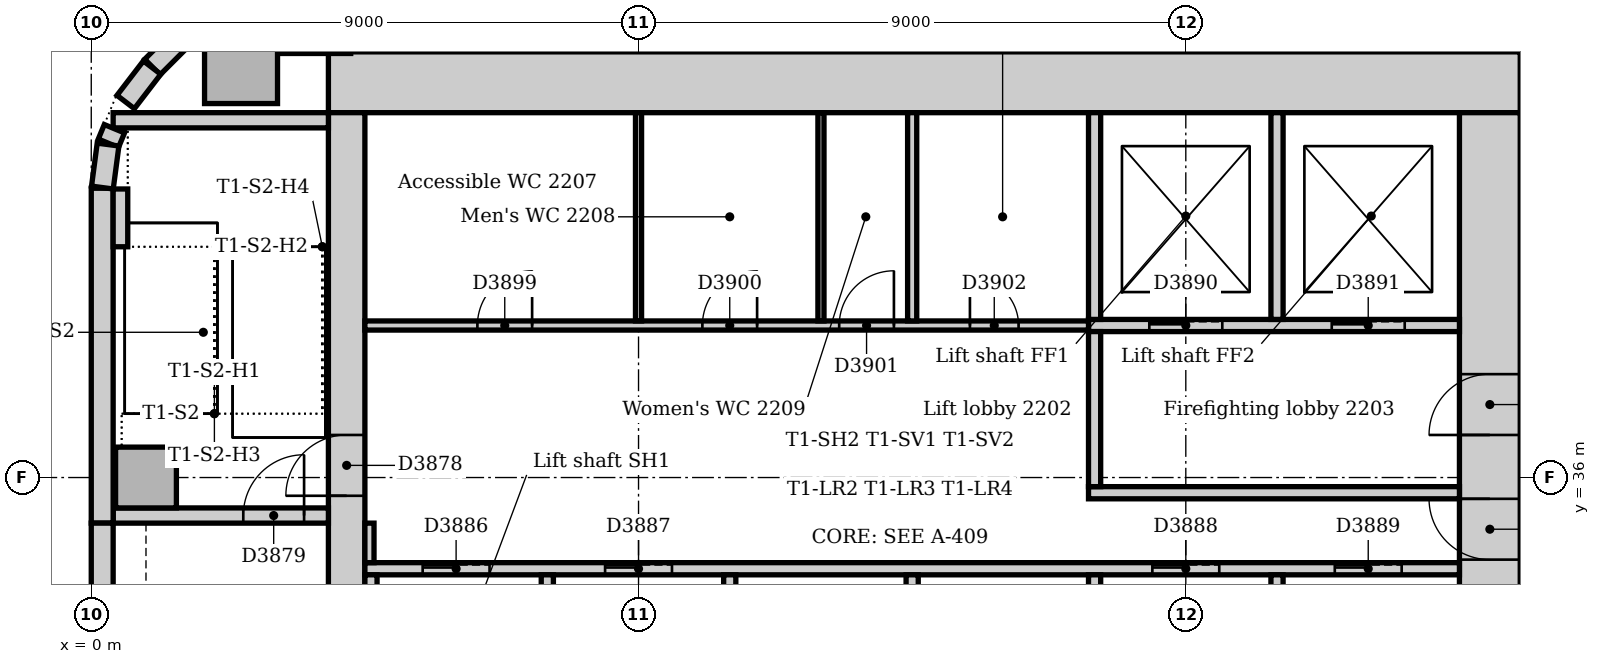
"""IFC4 building model, lengths in metres.
Left out: names, types, materials, properties, quantities, classifications, styles, units other than length and angle.
Written with IfcOpenShell. Run it as: python <this file> out.ifc"""

import sys

from ifc_helpers import new_model, si_unit, direction, frame, frame_2d, origin, origin_2d, place, context, subcontext, project, spatial, rectangle, extrude, element, fill, save


model = new_model("IFC4")
c1 = context("Model", 3, precision=1e-05, world=origin(), true_north=direction((0.0, 1.0)))
c2 = subcontext(c1, "Body", "Model", "MODEL_VIEW")
j1 = project(units=[si_unit("LENGTHUNIT", "METRE"), si_unit("PLANEANGLEUNIT", "RADIAN")], contexts=[c1])
p1 = place(None, origin())
s1 = spatial("IfcSite", under=j1, at=p1, CompositionType="ELEMENT")
p2 = place(p1, origin())
s2 = spatial("IfcBuilding", under=s1, at=p2, CompositionType="ELEMENT")
p3 = place(p2, frame((0.0, 0.0, 95.0)))
s3 = spatial("IfcBuildingStorey", under=s2, at=p3, CompositionType="ELEMENT", Elevation=95.0)
p4 = place(p3, frame((23.5, 42.5, 0.0), z_axis=(0.0, 0.0, 1.0), x_axis=(-1.0, 0.0, 0.0)))
e1 = element("IfcWall", 1, at=p4, inside=s3, PredefinedType="SOLIDWALL", context=c2, shape_type="SweptSolid", body=[
    extrude(rectangle(XDim=19.6, YDim=1.0, at=frame_2d((9.8, 0.0))), origin(), (0.0, 0.0, 1.0), 5.0),
])
p5 = place(p3, frame((23.0, 31.5, 0.0), z_axis=(0.0, 0.0, 1.0), x_axis=(0.0, 1.0, 0.0)))
e2 = element("IfcWall", 2, at=p5, inside=s3, PredefinedType="SOLIDWALL", context=c2, shape_type="SweptSolid", body=[
    extrude(rectangle(XDim=10.5, YDim=1.0, at=frame_2d((5.25, 0.0))), origin(), (0.0, 0.0, 1.0), 5.0),
])
p6 = place(p5, frame((3.15, 0.0, 0.0)))
e3 = element("IfcOpeningElement", 3, at=p6, cuts=e2, PredefinedType="OPENING", context=c2, shape_type="SweptSolid", body=[
    extrude(rectangle(XDim=1.0, YDim=2.1, at=frame_2d((0.5, 1.05))), frame((0.0, 0.51, 0.0), z_axis=(0.0, -1.0, 0.0), x_axis=(1.0, 0.0, 0.0)), (0.0, 0.0, 1.0), 1.02),
])
p7 = place(p5, frame((5.2, 0.0, 0.0)))
e4 = element("IfcOpeningElement", 4, at=p7, cuts=e2, PredefinedType="OPENING", context=c2, shape_type="SweptSolid", body=[
    extrude(rectangle(XDim=1.0, YDim=2.1, at=frame_2d((0.5, 1.05))), frame((0.0, 0.51, 0.0), z_axis=(0.0, -1.0, 0.0), x_axis=(1.0, 0.0, 0.0)), (0.0, 0.0, 1.0), 1.02),
])
p8 = place(p3, frame((4.2, 42.0, 0.0), z_axis=(0.0, 0.0, 1.0), x_axis=(0.0, -1.0, 0.0)))
e5 = element("IfcWall", 5, at=p8, inside=s3, PredefinedType="SOLIDWALL", context=c2, shape_type="SweptSolid", body=[
    extrude(rectangle(XDim=10.5, YDim=0.6, at=frame_2d((5.25, 0.0))), origin(), (0.0, 0.0, 1.0), 5.0),
])
p9 = place(p8, frame((5.3, 0.0, 0.0)))
e6 = element("IfcOpeningElement", 6, at=p9, cuts=e5, PredefinedType="OPENING", context=c2, shape_type="SweptSolid", body=[
    extrude(rectangle(XDim=1.0, YDim=2.1, at=frame_2d((0.5, 1.05))), frame((0.0, 0.31, 0.0), z_axis=(0.0, -1.0, 0.0), x_axis=(1.0, 0.0, 0.0)), (0.0, 0.0, 1.0), 0.62),
])
p10 = place(p3, frame((0.36, 35.375, 0.0), z_axis=(0.0, 0.0, 1.0), x_axis=(1.0, 0.0, 0.0)))
e7 = element("IfcWall", 7, at=p10, inside=s3, PredefinedType="SOLIDWALL", context=c2, shape_type="SweptSolid", body=[
    extrude(rectangle(XDim=3.54, YDim=0.25, at=frame_2d((1.77, 0.0))), origin(), (0.0, 0.0, 1.0), 5.0),
])
p11 = place(p10, frame((2.14, 0.0, 0.0)))
e8 = element("IfcOpeningElement", 8, at=p11, cuts=e7, PredefinedType="OPENING", context=c2, shape_type="SweptSolid", body=[
    extrude(rectangle(XDim=1.0, YDim=2.1, at=frame_2d((0.5, 1.05))), frame((0.0, 0.135, 0.0), z_axis=(0.0, -1.0, 0.0), x_axis=(1.0, 0.0, 0.0)), (0.0, 0.0, 1.0), 0.27),
])
p12 = place(p3, frame((3.9, 41.875, 0.0), z_axis=(0.0, 0.0, 1.0), x_axis=(-1.0, 0.0, 0.0)))
e9 = element("IfcWall", 9, at=p12, inside=s3, PredefinedType="SOLIDWALL", context=c2, shape_type="SweptSolid", body=[
    extrude(rectangle(XDim=3.54, YDim=0.25, at=frame_2d((1.77, 0.0))), origin(), (0.0, 0.0, 1.0), 5.0),
])
for number, where, z_axis, x_axis in (
    (10, (3.667, 43.574, 0.0), (0.0, 0.0, 1.0), (1.0, 0.0, 0.0)),
    (11, (2.463, 42.75, 0.0), (0.0, 0.0, 1.0), (1.0, 0.0, 0.0)),
):
    element("IfcColumn", number, at=place(p3, frame(where, z_axis=z_axis, x_axis=x_axis)), inside=s3, PredefinedType="COLUMN", context=c2, shape_type="SweptSolid", body=[
        extrude(rectangle(XDim=1.2, YDim=1.2, at=origin_2d()), origin(), (0.0, 0.0, 1.0), 4.85),
    ])
p13 = place(p3, frame((0.9, 36.0, 0.0), z_axis=(0.0, 0.0, 1.0), x_axis=(1.0, 0.0, 0.0)))
e12 = element("IfcColumn", 12, at=p13, inside=s3, PredefinedType="COLUMN", context=c2, shape_type="SweptSolid", body=[
    extrude(rectangle(XDim=1.0, YDim=1.0, at=origin_2d()), origin(), (0.0, 0.0, 1.0), 5.0),
])
p14 = place(p3, frame((2.249, 43.994, 0.0), z_axis=(0.0, 0.0, 1.0), x_axis=(-0.707106781187, -0.707106781187, 0.0)))
e13 = element("IfcWall", 13, at=p14, inside=s3, PredefinedType="STANDARD", context=c2, shape_type="SweptSolid", body=[
    extrude(rectangle(XDim=1.757, YDim=0.36, at=frame_2d((0.879, 0.0))), origin(), (0.0, 0.0, 1.0), 3.25),
])
p15 = place(p3, frame((0.18, 40.757, 0.0), z_axis=(0.0, 0.0, 1.0), x_axis=(0.0, -1.0, 0.0)))
e14 = element("IfcWall", 14, at=p15, inside=s3, PredefinedType="STANDARD", context=c2, shape_type="SweptSolid", body=[
    extrude(rectangle(XDim=5.507, YDim=0.36, at=frame_2d((2.754, 0.0))), origin(), (0.0, 0.0, 1.0), 4.85),
])
p16 = place(p3, frame((0.18, 35.25, 0.0), z_axis=(0.0, 0.0, 1.0), x_axis=(0.0, -1.0, 0.0)))
e15 = element("IfcWall", 15, at=p16, inside=s3, PredefinedType="STANDARD", context=c2, shape_type="SweptSolid", body=[
    extrude(rectangle(XDim=7.5, YDim=0.36, at=frame_2d((3.75, 0.0))), origin(), (0.0, 0.0, 1.0), 4.85),
])
p17 = place(p3, frame((1.0, 42.741, 0.0), z_axis=(0.0, 0.0, 1.0), x_axis=(-0.608802368033, -0.793321924995, 0.0)))
e16 = element("IfcWall", 16, at=p17, inside=s3, PredefinedType="STANDARD", context=c2, shape_type="SweptSolid", body=[
    extrude(rectangle(XDim=0.713, YDim=0.36, at=frame_2d((0.357, 0.0))), origin(), (0.0, 0.0, 1.0), 3.25),
])
p18 = place(p3, frame((0.381, 41.736, 0.0), z_axis=(0.0, 0.0, 1.0), x_axis=(-0.382773360986, -0.923842277729, 0.0)))
e17 = element("IfcWall", 17, at=p18, inside=s3, PredefinedType="STANDARD", context=c2, shape_type="SweptSolid", body=[
    extrude(rectangle(XDim=0.258, YDim=0.36, at=frame_2d((0.129, 0.0))), origin(), (0.0, 0.0, 1.0), 3.25),
])
p19 = place(p3, frame((0.276, 41.476, 0.0), z_axis=(0.0, 0.0, 1.0), x_axis=(-0.13055608231, -0.99144092581, 0.0)))
e18 = element("IfcWall", 18, at=p19, inside=s3, PredefinedType="STANDARD", context=c2, shape_type="SweptSolid", body=[
    extrude(rectangle(XDim=0.713, YDim=0.36, at=frame_2d((0.356, 0.0))), origin(), (0.0, 0.0, 1.0), 3.25),
])
p20 = place(p3, frame((0.48, 39.795, 0.0), z_axis=(0.0, 0.0, 1.0), x_axis=(0.0, 1.0, 0.0)))
e19 = element("IfcWall", 19, at=p20, inside=s3, PredefinedType="STANDARD", context=c2, shape_type="SweptSolid", body=[
    extrude(rectangle(XDim=0.95, YDim=0.24, at=frame_2d((0.475, 0.0))), origin(), (0.0, 0.0, 1.0), 5.0),
])
p21 = place(p3, frame((16.4, 35.75, 0.0), z_axis=(0.0, 0.0, 1.0), x_axis=(1.0, 0.0, 0.0)))
e20 = element("IfcWall", 20, at=p21, inside=s3, PredefinedType="PARTITIONING", context=c2, shape_type="SweptSolid", body=[
    extrude(rectangle(XDim=6.1, YDim=0.2, at=frame_2d((3.05, 0.0))), origin(), (0.0, 0.0, 1.0), 4.85),
])
p22 = place(p3, frame((16.4, 38.5, 0.0), z_axis=(0.0, 0.0, 1.0), x_axis=(1.0, 0.0, 0.0)))
e21 = element("IfcWall", 21, at=p22, inside=s3, PredefinedType="PARTITIONING", context=c2, shape_type="SweptSolid", body=[
    extrude(rectangle(XDim=6.1, YDim=0.2, at=frame_2d((3.05, 0.0))), origin(), (0.0, 0.0, 1.0), 4.85),
])
p23 = place(p22, frame((1.0, 0.0, 0.0)))
e22 = element("IfcOpeningElement", 22, at=p23, cuts=e21, PredefinedType="OPENING", context=c2, shape_type="SweptSolid", body=[
    extrude(rectangle(XDim=1.2, YDim=2.1, at=frame_2d((0.6, 1.05))), frame((0.0, 0.11, 0.0), z_axis=(0.0, -1.0, 0.0), x_axis=(1.0, 0.0, 0.0)), (0.0, 0.0, 1.0), 0.22),
])
p24 = place(p22, frame((4.0, 0.0, 0.0)))
e23 = element("IfcOpeningElement", 23, at=p24, cuts=e21, PredefinedType="OPENING", context=c2, shape_type="SweptSolid", body=[
    extrude(rectangle(XDim=1.2, YDim=2.1, at=frame_2d((0.6, 1.05))), frame((0.0, 0.11, 0.0), z_axis=(0.0, -1.0, 0.0), x_axis=(1.0, 0.0, 0.0)), (0.0, 0.0, 1.0), 0.22),
])
p25 = place(p3, frame((16.5, 35.85, 0.0), z_axis=(0.0, 0.0, 1.0), x_axis=(0.0, 1.0, 0.0)))
e24 = element("IfcWall", 24, at=p25, inside=s3, PredefinedType="PARTITIONING", context=c2, shape_type="SweptSolid", body=[
    extrude(rectangle(XDim=2.55, YDim=0.2, at=frame_2d((1.275, 0.0))), origin(), (0.0, 0.0, 1.0), 4.85),
])
p26 = place(p3, frame((4.5, 34.5, 0.0), z_axis=(0.0, 0.0, 1.0), x_axis=(1.0, 0.0, 0.0)))
e25 = element("IfcWall", 25, at=p26, inside=s3, PredefinedType="PARTITIONING", context=c2, shape_type="SweptSolid", body=[
    extrude(rectangle(XDim=18.0, YDim=0.2, at=frame_2d((9.0, 0.0))), origin(), (0.0, 0.0, 1.0), 4.85),
])
p27 = place(p26, frame((0.95, 0.0, 0.0)))
e26 = element("IfcOpeningElement", 26, at=p27, cuts=e25, PredefinedType="OPENING", context=c2, shape_type="SweptSolid", body=[
    extrude(rectangle(XDim=1.1, YDim=2.1, at=frame_2d((0.55, 1.05))), frame((0.0, 0.11, 0.0), z_axis=(0.0, -1.0, 0.0), x_axis=(1.0, 0.0, 0.0)), (0.0, 0.0, 1.0), 0.22),
])
p28 = place(p26, frame((3.95, 0.0, 0.0)))
e27 = element("IfcOpeningElement", 27, at=p28, cuts=e25, PredefinedType="OPENING", context=c2, shape_type="SweptSolid", body=[
    extrude(rectangle(XDim=1.1, YDim=2.1, at=frame_2d((0.55, 1.05))), frame((0.0, 0.11, 0.0), z_axis=(0.0, -1.0, 0.0), x_axis=(1.0, 0.0, 0.0)), (0.0, 0.0, 1.0), 0.22),
])
p29 = place(p26, frame((12.95, 0.0, 0.0)))
e28 = element("IfcOpeningElement", 28, at=p29, cuts=e25, PredefinedType="OPENING", context=c2, shape_type="SweptSolid", body=[
    extrude(rectangle(XDim=1.1, YDim=2.1, at=frame_2d((0.55, 1.05))), frame((0.0, 0.11, 0.0), z_axis=(0.0, -1.0, 0.0), x_axis=(1.0, 0.0, 0.0)), (0.0, 0.0, 1.0), 0.22),
])
p30 = place(p26, frame((15.95, 0.0, 0.0)))
e29 = element("IfcOpeningElement", 29, at=p30, cuts=e25, PredefinedType="OPENING", context=c2, shape_type="SweptSolid", body=[
    extrude(rectangle(XDim=1.1, YDim=2.1, at=frame_2d((0.55, 1.05))), frame((0.0, 0.11, 0.0), z_axis=(0.0, -1.0, 0.0), x_axis=(1.0, 0.0, 0.0)), (0.0, 0.0, 1.0), 0.22),
])
for number, where, z_axis, x_axis in (
    (30, (16.5, 38.6, 0.0), (0.0, 0.0, 1.0), (0.0, 1.0, 0.0)),
    (31, (19.5, 38.6, 0.0), (0.0, 0.0, 1.0), (0.0, 1.0, 0.0)),
):
    element("IfcWall", number, at=place(p3, frame(where, z_axis=z_axis, x_axis=x_axis)), inside=s3, PredefinedType="PARTITIONING", context=c2, shape_type="SweptSolid", body=[
        extrude(rectangle(XDim=3.4, YDim=0.2, at=frame_2d((1.7, 0.0))), origin(), (0.0, 0.0, 1.0), 4.85),
    ])
for number, where, z_axis, x_axis in (
    (32, (4.6, 31.75, 0.0), (0.0, 0.0, 1.0), (0.0, 1.0, 0.0)),
    (33, (7.5, 31.75, 0.0), (0.0, 0.0, 1.0), (0.0, 1.0, 0.0)),
    (34, (10.5, 31.75, 0.0), (0.0, 0.0, 1.0), (0.0, 1.0, 0.0)),
    (35, (13.5, 31.75, 0.0), (0.0, 0.0, 1.0), (0.0, 1.0, 0.0)),
    (36, (16.5, 31.75, 0.0), (0.0, 0.0, 1.0), (0.0, 1.0, 0.0)),
    (37, (19.5, 31.75, 0.0), (0.0, 0.0, 1.0), (0.0, 1.0, 0.0)),
):
    element("IfcWall", number, at=place(p3, frame(where, z_axis=z_axis, x_axis=x_axis)), inside=s3, PredefinedType="PARTITIONING", context=c2, shape_type="SweptSolid", body=[
        extrude(rectangle(XDim=2.65, YDim=0.2, at=frame_2d((1.325, 0.0))), origin(), (0.0, 0.0, 1.0), 4.85),
    ])
p31 = place(p3, frame((4.5, 38.5, 0.0), z_axis=(0.0, 0.0, 1.0), x_axis=(1.0, 0.0, 0.0)))
e38 = element("IfcWall", 38, at=p31, inside=s3, PredefinedType="PARTITIONING", context=c2, shape_type="SweptSolid", body=[
    extrude(rectangle(XDim=11.9, YDim=0.15, at=frame_2d((5.95, 0.0))), origin(), (0.0, 0.0, 1.0), 4.85),
])
p32 = place(p31, frame((1.85, 0.0, 0.0)))
e39 = element("IfcOpeningElement", 39, at=p32, cuts=e38, PredefinedType="OPENING", context=c2, shape_type="SweptSolid", body=[
    extrude(rectangle(XDim=0.9, YDim=2.1, at=frame_2d((0.45, 1.05))), frame((0.0, 0.085, 0.0), z_axis=(0.0, -1.0, 0.0), x_axis=(1.0, 0.0, 0.0)), (0.0, 0.0, 1.0), 0.17),
])
p33 = place(p31, frame((5.55, 0.0, 0.0)))
e40 = element("IfcOpeningElement", 40, at=p33, cuts=e38, PredefinedType="OPENING", context=c2, shape_type="SweptSolid", body=[
    extrude(rectangle(XDim=0.9, YDim=2.1, at=frame_2d((0.45, 1.05))), frame((0.0, 0.085, 0.0), z_axis=(0.0, -1.0, 0.0), x_axis=(1.0, 0.0, 0.0)), (0.0, 0.0, 1.0), 0.17),
])
p34 = place(p31, frame((7.8, 0.0, 0.0)))
e41 = element("IfcOpeningElement", 41, at=p34, cuts=e38, PredefinedType="OPENING", context=c2, shape_type="SweptSolid", body=[
    extrude(rectangle(XDim=0.9, YDim=2.1, at=frame_2d((0.45, 1.05))), frame((0.0, 0.085, 0.0), z_axis=(0.0, -1.0, 0.0), x_axis=(1.0, 0.0, 0.0)), (0.0, 0.0, 1.0), 0.17),
])
p35 = place(p31, frame((9.95, 0.0, 0.0)))
e42 = element("IfcOpeningElement", 42, at=p35, cuts=e38, PredefinedType="OPENING", context=c2, shape_type="SweptSolid", body=[
    extrude(rectangle(XDim=0.8, YDim=2.1, at=frame_2d((0.4, 1.05))), frame((0.0, 0.085, 0.0), z_axis=(0.0, -1.0, 0.0), x_axis=(1.0, 0.0, 0.0)), (0.0, 0.0, 1.0), 0.17),
])
p36 = place(p3, frame((4.575, 34.6, 0.0), z_axis=(0.0, 0.0, 1.0), x_axis=(0.0, 1.0, 0.0)))
e43 = element("IfcWall", 43, at=p36, inside=s3, PredefinedType="PARTITIONING", context=c2, shape_type="SweptSolid", body=[
    extrude(rectangle(XDim=0.65, YDim=0.15, at=frame_2d((0.325, 0.0))), origin(), (0.0, 0.0, 1.0), 4.85),
])
p37 = place(p3, frame((13.5, 38.575, 0.0), z_axis=(0.0, 0.0, 1.0), x_axis=(0.0, 1.0, 0.0)))
e44 = element("IfcWall", 44, at=p37, inside=s3, PredefinedType="PARTITIONING", context=c2, shape_type="SweptSolid", body=[
    extrude(rectangle(XDim=3.425, YDim=0.15, at=frame_2d((1.712, 0.0))), origin(), (0.0, 0.0, 1.0), 4.85),
])
for number, where, z_axis, x_axis in (
    (45, (9.0, 38.575, 0.0), (0.0, 0.0, 1.0), (0.0, 1.0, 0.0)),
    (46, (12.0, 38.575, 0.0), (0.0, 0.0, 1.0), (0.0, 1.0, 0.0)),
):
    element("IfcWall", number, at=place(p3, frame(where, z_axis=z_axis, x_axis=x_axis)), inside=s3, PredefinedType="PARTITIONING", context=c2, shape_type="SweptSolid", body=[
        extrude(rectangle(XDim=3.425, YDim=0.1, at=frame_2d((1.712, 0.0))), origin(), (0.0, 0.0, 1.0), 4.85),
    ])
p38 = place(p9, frame((1.0, 0.0, 0.0), z_axis=(0.0, 0.0, 1.0), x_axis=(-1.0, 0.0, 0.0)))
e47 = element("IfcDoor", 47, at=p38, inside=s3, OperationType="SINGLE_SWING_LEFT", PredefinedType="DOOR", context=c2, shape_type="SweptSolid", body=[
    extrude(rectangle(XDim=1.0, YDim=2.1, at=frame_2d((0.5, 1.05))), frame((0.0, 0.025, 0.0), z_axis=(0.0, -1.0, 0.0), x_axis=(1.0, 0.0, 0.0)), (0.0, 0.0, 1.0), 0.05),
])
fill(e6, e47)
p39 = place(p11, origin())
e48 = element("IfcDoor", 48, at=p39, inside=s3, OperationType="SINGLE_SWING_RIGHT", PredefinedType="DOOR", context=c2, shape_type="SweptSolid", body=[
    extrude(rectangle(XDim=1.0, YDim=2.1, at=frame_2d((0.5, 1.05))), frame((0.0, 0.025, 0.0), z_axis=(0.0, -1.0, 0.0), x_axis=(1.0, 0.0, 0.0)), (0.0, 0.0, 1.0), 0.05),
])
fill(e8, e48)
p40 = place(p27, origin())
e49 = element("IfcDoor", 49, at=p40, inside=s3, OperationType="SLIDING_TO_LEFT", PredefinedType="DOOR", context=c2, shape_type="SweptSolid", body=[
    extrude(rectangle(XDim=1.1, YDim=2.1, at=frame_2d((0.55, 1.05))), frame((0.0, 0.025, 0.0), z_axis=(0.0, -1.0, 0.0), x_axis=(1.0, 0.0, 0.0)), (0.0, 0.0, 1.0), 0.05),
])
fill(e26, e49)
p41 = place(p28, origin())
e50 = element("IfcDoor", 50, at=p41, inside=s3, OperationType="SLIDING_TO_LEFT", PredefinedType="DOOR", context=c2, shape_type="SweptSolid", body=[
    extrude(rectangle(XDim=1.1, YDim=2.1, at=frame_2d((0.55, 1.05))), frame((0.0, 0.025, 0.0), z_axis=(0.0, -1.0, 0.0), x_axis=(1.0, 0.0, 0.0)), (0.0, 0.0, 1.0), 0.05),
])
fill(e27, e50)
p42 = place(p29, origin())
e51 = element("IfcDoor", 51, at=p42, inside=s3, OperationType="SLIDING_TO_LEFT", PredefinedType="DOOR", context=c2, shape_type="SweptSolid", body=[
    extrude(rectangle(XDim=1.1, YDim=2.1, at=frame_2d((0.55, 1.05))), frame((0.0, 0.025, 0.0), z_axis=(0.0, -1.0, 0.0), x_axis=(1.0, 0.0, 0.0)), (0.0, 0.0, 1.0), 0.05),
])
fill(e28, e51)
p43 = place(p30, origin())
e52 = element("IfcDoor", 52, at=p43, inside=s3, OperationType="SLIDING_TO_LEFT", PredefinedType="DOOR", context=c2, shape_type="SweptSolid", body=[
    extrude(rectangle(XDim=1.1, YDim=2.1, at=frame_2d((0.55, 1.05))), frame((0.0, 0.025, 0.0), z_axis=(0.0, -1.0, 0.0), x_axis=(1.0, 0.0, 0.0)), (0.0, 0.0, 1.0), 0.05),
])
fill(e29, e52)
p44 = place(p23, origin())
e53 = element("IfcDoor", 53, at=p44, inside=s3, OperationType="SLIDING_TO_LEFT", PredefinedType="DOOR", context=c2, shape_type="SweptSolid", body=[
    extrude(rectangle(XDim=1.2, YDim=2.1, at=frame_2d((0.6, 1.05))), frame((0.0, 0.025, 0.0), z_axis=(0.0, -1.0, 0.0), x_axis=(1.0, 0.0, 0.0)), (0.0, 0.0, 1.0), 0.05),
])
fill(e22, e53)
p45 = place(p24, origin())
e54 = element("IfcDoor", 54, at=p45, inside=s3, OperationType="SLIDING_TO_LEFT", PredefinedType="DOOR", context=c2, shape_type="SweptSolid", body=[
    extrude(rectangle(XDim=1.2, YDim=2.1, at=frame_2d((0.6, 1.05))), frame((0.0, 0.025, 0.0), z_axis=(0.0, -1.0, 0.0), x_axis=(1.0, 0.0, 0.0)), (0.0, 0.0, 1.0), 0.05),
])
fill(e23, e54)
p46 = place(p6, origin())
e55 = element("IfcDoor", 55, at=p46, inside=s3, OperationType="SINGLE_SWING_RIGHT", PredefinedType="DOOR", context=c2, shape_type="SweptSolid", body=[
    extrude(rectangle(XDim=1.0, YDim=2.1, at=frame_2d((0.5, 1.05))), frame((0.0, 0.025, 0.0), z_axis=(0.0, -1.0, 0.0), x_axis=(1.0, 0.0, 0.0)), (0.0, 0.0, 1.0), 0.05),
])
fill(e3, e55)
p47 = place(p7, origin())
e56 = element("IfcDoor", 56, at=p47, inside=s3, OperationType="SINGLE_SWING_LEFT", PredefinedType="DOOR", context=c2, shape_type="SweptSolid", body=[
    extrude(rectangle(XDim=1.0, YDim=2.1, at=frame_2d((0.5, 1.05))), frame((0.0, 0.025, 0.0), z_axis=(0.0, -1.0, 0.0), x_axis=(1.0, 0.0, 0.0)), (0.0, 0.0, 1.0), 0.05),
])
fill(e4, e56)
p48 = place(p32, origin())
e57 = element("IfcDoor", 57, at=p48, inside=s3, OperationType="SINGLE_SWING_RIGHT", PredefinedType="DOOR", context=c2, shape_type="SweptSolid", body=[
    extrude(rectangle(XDim=0.9, YDim=2.1, at=frame_2d((0.45, 1.05))), frame((0.0, 0.025, 0.0), z_axis=(0.0, -1.0, 0.0), x_axis=(1.0, 0.0, 0.0)), (0.0, 0.0, 1.0), 0.05),
])
fill(e39, e57)
p49 = place(p33, origin())
e58 = element("IfcDoor", 58, at=p49, inside=s3, OperationType="SINGLE_SWING_RIGHT", PredefinedType="DOOR", context=c2, shape_type="SweptSolid", body=[
    extrude(rectangle(XDim=0.9, YDim=2.1, at=frame_2d((0.45, 1.05))), frame((0.0, 0.025, 0.0), z_axis=(0.0, -1.0, 0.0), x_axis=(1.0, 0.0, 0.0)), (0.0, 0.0, 1.0), 0.05),
])
fill(e40, e58)
p50 = place(p34, origin())
e59 = element("IfcDoor", 59, at=p50, inside=s3, OperationType="SINGLE_SWING_RIGHT", PredefinedType="DOOR", context=c2, shape_type="SweptSolid", body=[
    extrude(rectangle(XDim=0.9, YDim=2.1, at=frame_2d((0.45, 1.05))), frame((0.0, 0.025, 0.0), z_axis=(0.0, -1.0, 0.0), x_axis=(1.0, 0.0, 0.0)), (0.0, 0.0, 1.0), 0.05),
])
fill(e41, e59)
p51 = place(p35, origin())
e60 = element("IfcDoor", 60, at=p51, inside=s3, OperationType="SINGLE_SWING_LEFT", PredefinedType="DOOR", context=c2, shape_type="SweptSolid", body=[
    extrude(rectangle(XDim=0.8, YDim=2.1, at=frame_2d((0.4, 1.05))), frame((0.0, 0.025, 0.0), z_axis=(0.0, -1.0, 0.0), x_axis=(1.0, 0.0, 0.0)), (0.0, 0.0, 1.0), 0.05),
])
fill(e42, e60)
save(model, sys.argv[1])
